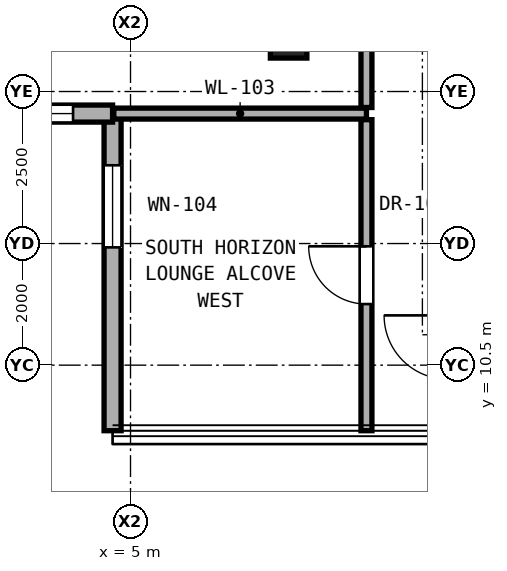
"""IFC4 building model, lengths in metres.
Left out: names, types, materials, properties, quantities, classifications, styles, units other than length and angle.
Written with IfcOpenShell. Run it as: python <this file> out.ifc"""

import sys

from ifc_helpers import new_model, si_unit, direction, frame, frame_2d, origin, origin_2d, place, context, subcontext, project, spatial, rectangle, extrude, element, fill, save


model = new_model("IFC4")
c1 = context("Model", 3, precision=1e-05, world=origin(), true_north=direction((0.0, 1.0)))
c2 = subcontext(c1, "Body", "Model", "MODEL_VIEW")
j1 = project(units=[si_unit("LENGTHUNIT", "METRE"), si_unit("PLANEANGLEUNIT", "RADIAN")], contexts=[c1])
p1 = place(None, origin())
s1 = spatial("IfcSite", under=j1, at=p1, CompositionType="ELEMENT")
p2 = place(p1, origin())
s2 = spatial("IfcBuilding", under=s1, at=p2, CompositionType="ELEMENT")
p3 = place(p2, frame((0.0, 0.0, 203.15)))
s3 = spatial("IfcBuildingStorey", under=s2, at=p3, CompositionType="ELEMENT", Elevation=203.15)
p4 = place(p3, frame((7.6, 16.0, 0.0), z_axis=(0.0, 0.0, 1.0), x_axis=(1.0, 0.0, 0.0)))
e1 = element("IfcColumn", 1, at=p4, inside=s3, PredefinedType="PILASTER", context=c2, shape_type="SweptSolid", body=[
    extrude(rectangle(XDim=0.6, YDim=0.9, at=origin_2d()), origin(), (0.0, 0.0, 1.0), 3.25),
])
p5 = place(p3, frame((4.705, 14.637, 0.0), z_axis=(0.0, 0.0, 1.0), x_axis=(0.0, -1.0, 0.0)))
e2 = element("IfcWall", 2, at=p5, inside=s3, PredefinedType="SOLIDWALL", context=c2, shape_type="SweptSolid", body=[
    extrude(rectangle(XDim=5.215, YDim=0.28, at=frame_2d((2.607, 0.0))), origin(), (0.0, 0.0, 1.0), 3.03),
])
p6 = place(p5, frame((0.85, 0.0, 0.68)))
e3 = element("IfcOpeningElement", 3, at=p6, cuts=e2, PredefinedType="OPENING", context=c2, shape_type="SweptSolid", body=[
    extrude(rectangle(XDim=1.35, YDim=2.2, at=frame_2d((0.675, 1.1))), frame((0.0, 0.15, 0.0), z_axis=(0.0, -1.0, 0.0), x_axis=(1.0, 0.0, 0.0)), (0.0, 0.0, 1.0), 0.3),
])
p7 = place(p3, frame((-0.51, 14.637, 0.0), z_axis=(0.0, 0.0, 1.0), x_axis=(1.0, 0.0, 0.0)))
e4 = element("IfcWall", 4, at=p7, inside=s3, PredefinedType="SOLIDWALL", context=c2, shape_type="SweptSolid", body=[
    extrude(rectangle(XDim=5.215, YDim=0.28, at=frame_2d((2.607, 0.0))), origin(), (0.0, 0.0, 1.0), 3.03),
])
p8 = place(p7, frame((3.465, 0.0, 0.85)))
e5 = element("IfcOpeningElement", 5, at=p8, cuts=e4, PredefinedType="OPENING", context=c2, shape_type="SweptSolid", body=[
    extrude(rectangle(XDim=1.1, YDim=2.0, at=frame_2d((0.55, 1.0))), frame((0.0, 0.15, 0.0), z_axis=(0.0, -1.0, 0.0), x_axis=(1.0, 0.0, 0.0)), (0.0, 0.0, 1.0), 0.3),
])
p9 = place(p3, frame((4.725, 14.637, 0.0), z_axis=(0.0, 0.0, 1.0), x_axis=(1.0, 0.0, 0.0)))
e6 = element("IfcWall", 6, at=p9, inside=s3, PredefinedType="PARTITIONING", context=c2, shape_type="SweptSolid", body=[
    extrude(rectangle(XDim=4.155, YDim=0.18, at=frame_2d((2.077, 0.0))), origin(), (0.0, 0.0, 1.0), 3.05),
])
p10 = place(p3, frame((8.88, 9.422, 0.0), z_axis=(0.0, 0.0, 1.0), x_axis=(0.0, 1.0, 0.0)))
e7 = element("IfcWall", 7, at=p10, inside=s3, PredefinedType="PARTITIONING", context=c2, shape_type="SweptSolid", body=[
    extrude(rectangle(XDim=5.115, YDim=0.18, at=frame_2d((2.558, 0.0))), origin(), (0.0, 0.0, 1.0), 3.05),
])
p11 = place(p10, frame((2.083, 0.0, 0.0)))
e8 = element("IfcOpeningElement", 8, at=p11, cuts=e7, PredefinedType="OPENING", context=c2, shape_type="SweptSolid", body=[
    extrude(rectangle(XDim=0.95, YDim=2.15, at=frame_2d((0.475, 1.075))), frame((0.0, 0.1, 0.0), z_axis=(0.0, -1.0, 0.0), x_axis=(1.0, 0.0, 0.0)), (0.0, 0.0, 1.0), 0.2),
])
p12 = place(p3, frame((8.88, 14.737, 0.0), z_axis=(0.0, 0.0, 1.0), x_axis=(0.0, 1.0, 0.0)))
e9 = element("IfcWall", 9, at=p12, inside=s3, PredefinedType="PARTITIONING", context=c2, shape_type="SweptSolid", body=[
    extrude(rectangle(XDim=10.443, YDim=0.18, at=frame_2d((5.221, 0.0))), origin(), (0.0, 0.0, 1.0), 2.346),
])
p13 = place(p12, frame((4.697, 0.0, 0.0)))
e10 = element("IfcOpeningElement", 10, at=p13, cuts=e9, PredefinedType="OPENING", context=c2, shape_type="SweptSolid", body=[
    extrude(rectangle(XDim=1.05, YDim=2.2, at=frame_2d((0.525, 1.1))), frame((0.0, 0.1, 0.0), z_axis=(0.0, -1.0, 0.0), x_axis=(1.0, 0.0, 0.0)), (0.0, 0.0, 1.0), 0.2),
])
p14 = place(p6, origin())
e11 = element("IfcWindow", 11, at=p14, inside=s3, PartitioningType="SINGLE_PANEL", PredefinedType="WINDOW", context=c2, shape_type="SweptSolid", body=[
    extrude(rectangle(XDim=1.35, YDim=2.2, at=frame_2d((0.675, 1.1))), frame((0.0, 0.03, 0.0), z_axis=(0.0, -1.0, 0.0), x_axis=(1.0, 0.0, 0.0)), (0.0, 0.0, 1.0), 0.06),
])
fill(e3, e11)
p15 = place(p8, origin())
e12 = element("IfcWindow", 12, at=p15, inside=s3, PartitioningType="SINGLE_PANEL", PredefinedType="WINDOW", context=c2, shape_type="SweptSolid", body=[
    extrude(rectangle(XDim=1.1, YDim=2.0, at=frame_2d((0.55, 1.0))), frame((0.0, 0.03, 0.0), z_axis=(0.0, -1.0, 0.0), x_axis=(1.0, 0.0, 0.0)), (0.0, 0.0, 1.0), 0.06),
])
fill(e5, e12)
p16 = place(p11, origin())
e13 = element("IfcDoor", 13, at=p16, inside=s3, OperationType="SINGLE_SWING_RIGHT", PredefinedType="DOOR", context=c2, shape_type="SweptSolid", body=[
    extrude(rectangle(XDim=0.95, YDim=2.15, at=frame_2d((0.475, 1.075))), frame((0.0, 0.025, 0.0), z_axis=(0.0, -1.0, 0.0), x_axis=(1.0, 0.0, 0.0)), (0.0, 0.0, 1.0), 0.05),
])
fill(e8, e13)
save(model, sys.argv[1])
